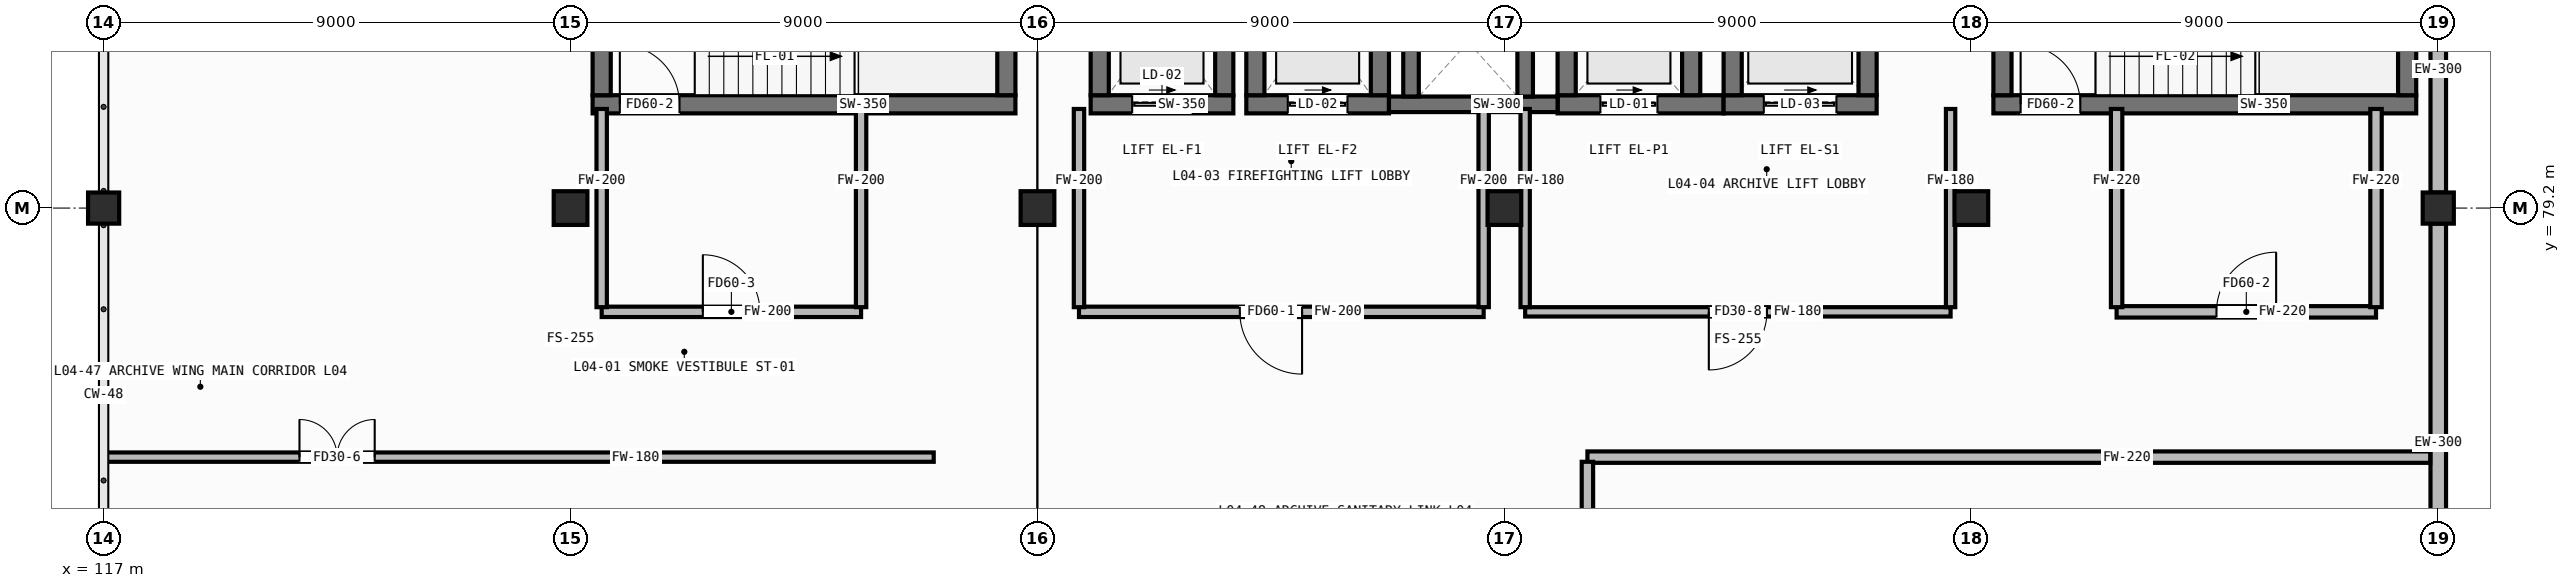
"""IFC4 building model, lengths in metres.
Left out: names, types, materials, properties, quantities, classifications, styles, units other than length and angle.
Written with IfcOpenShell. Run it as: python <this file> out.ifc"""

import sys

from ifc_helpers import new_model, si_unit, direction, frame, frame_2d, origin, origin_2d, place, context, subcontext, project, spatial, rectangle, hollow_rectangle, extrude, element, fill, save


model = new_model("IFC4")
c1 = context("Model", 3, precision=1e-05, world=origin(), true_north=direction((0.0, 1.0)))
c2 = subcontext(c1, "Body", "Model", "MODEL_VIEW")
j1 = project(units=[si_unit("LENGTHUNIT", "METRE"), si_unit("PLANEANGLEUNIT", "RADIAN")], contexts=[c1])
p1 = place(None, origin())
s1 = spatial("IfcSite", under=j1, at=p1, CompositionType="ELEMENT")
p2 = place(p1, origin())
s2 = spatial("IfcBuilding", under=s1, at=p2, CompositionType="ELEMENT")
p3 = place(p2, frame((0.0, 0.0, 12.8)))
s3 = spatial("IfcBuildingStorey", under=s2, at=p3, CompositionType="ELEMENT", Elevation=12.8)
p4 = place(p3, frame((117.0, 79.2, 0.0), z_axis=(0.0, 0.0, 1.0), x_axis=(1.0, 0.0, 0.0)))
e1 = element("IfcColumn", 1, at=p4, inside=s3, PredefinedType="COLUMN", context=c2, shape_type="SweptSolid", body=[
    extrude(hollow_rectangle(XDim=0.6, YDim=0.6, WallThickness=0.025, at=origin_2d()), origin(), (0.0, 0.0, 1.0), 4.2),
])
for number, where, z_axis, x_axis in (
    (2, (126.0, 79.2, 0.0), (0.0, 0.0, 1.0), (1.0, 0.0, 0.0)),
    (3, (135.0, 79.2, 0.0), (0.0, 0.0, 1.0), (1.0, 0.0, 0.0)),
    (4, (144.0, 79.2, 0.0), (0.0, 0.0, 1.0), (1.0, 0.0, 0.0)),
    (5, (153.0, 79.2, 0.0), (0.0, 0.0, 1.0), (1.0, 0.0, 0.0)),
):
    element("IfcColumn", number, at=place(p3, frame(where, z_axis=z_axis, x_axis=x_axis)), inside=s3, PredefinedType="COLUMN", context=c2, shape_type="SweptSolid", body=[
        extrude(hollow_rectangle(XDim=0.65, YDim=0.65, WallThickness=0.025, at=origin_2d()), origin(), (0.0, 0.0, 1.0), 4.2),
    ])
p5 = place(p3, frame((162.0, 79.2, 0.0), z_axis=(0.0, 0.0, 1.0), x_axis=(1.0, 0.0, 0.0)))
e6 = element("IfcColumn", 6, at=p5, inside=s3, PredefinedType="COLUMN", context=c2, shape_type="SweptSolid", body=[
    extrude(hollow_rectangle(XDim=0.6, YDim=0.6, WallThickness=0.025, at=origin_2d()), origin(), (0.0, 0.0, 1.0), 4.2),
])
p6 = place(p3, frame((162.0, 78.9, 0.0), z_axis=(0.0, 0.0, 1.0), x_axis=(0.0, -1.0, 0.0)))
e7 = element("IfcWall", 7, at=p6, inside=s3, PredefinedType="STANDARD", context=c2, shape_type="SweptSolid", body=[
    extrude(rectangle(XDim=6.6, YDim=0.3, at=frame_2d((3.3, 0.0))), origin(), (0.0, 0.0, 1.0), 3.49),
])
p7 = place(p3, frame((162.0, 86.1, 0.0), z_axis=(0.0, 0.0, 1.0), x_axis=(0.0, -1.0, 0.0)))
e8 = element("IfcWall", 8, at=p7, inside=s3, PredefinedType="STANDARD", context=c2, shape_type="SweptSolid", body=[
    extrude(rectangle(XDim=6.6, YDim=0.3, at=frame_2d((3.3, 0.0))), origin(), (0.0, 0.0, 1.0), 3.49),
])
p8 = place(p3, frame((126.425, 81.2, 0.0), z_axis=(0.0, 0.0, 1.0), x_axis=(1.0, 0.0, 0.0)))
e9 = element("IfcWall", 9, at=p8, inside=s3, PredefinedType="SHEAR", context=c2, shape_type="SweptSolid", body=[
    extrude(rectangle(XDim=8.15, YDim=0.35, at=frame_2d((4.075, 0.0))), origin(), (0.0, 0.0, 1.0), 3.94),
])
p9 = place(p8, frame((0.525, 0.0, 0.0)))
e10 = element("IfcOpeningElement", 10, at=p9, cuts=e9, PredefinedType="OPENING", context=c2, shape_type="SweptSolid", body=[
    extrude(rectangle(XDim=1.15, YDim=2.1, at=frame_2d((0.575, 1.05))), frame((0.0, 0.187, 0.0), z_axis=(0.0, -1.0, 0.0), x_axis=(1.0, 0.0, 0.0)), (0.0, 0.0, 1.0), 0.374),
])
for number, where, z_axis, x_axis in (
    (11, (126.6, 81.375, 0.0), (0.0, 0.0, 1.0), (0.0, 1.0, 0.0)),
    (12, (134.4, 81.375, 0.0), (0.0, 0.0, 1.0), (0.0, 1.0, 0.0)),
):
    element("IfcWall", number, at=place(p3, frame(where, z_axis=z_axis, x_axis=x_axis)), inside=s3, PredefinedType="SHEAR", context=c2, shape_type="SweptSolid", body=[
        extrude(rectangle(XDim=3.55, YDim=0.35, at=frame_2d((1.775, 0.0))), origin(), (0.0, 0.0, 1.0), 3.94),
    ])
p10 = place(p3, frame((153.425, 81.2, 0.0), z_axis=(0.0, 0.0, 1.0), x_axis=(1.0, 0.0, 0.0)))
e13 = element("IfcWall", 13, at=p10, inside=s3, PredefinedType="SHEAR", context=c2, shape_type="SweptSolid", body=[
    extrude(rectangle(XDim=8.15, YDim=0.35, at=frame_2d((4.075, 0.0))), origin(), (0.0, 0.0, 1.0), 3.94),
])
p11 = place(p10, frame((0.525, 0.0, 0.0)))
e14 = element("IfcOpeningElement", 14, at=p11, cuts=e13, PredefinedType="OPENING", context=c2, shape_type="SweptSolid", body=[
    extrude(rectangle(XDim=1.15, YDim=2.1, at=frame_2d((0.575, 1.05))), frame((0.0, 0.187, 0.0), z_axis=(0.0, -1.0, 0.0), x_axis=(1.0, 0.0, 0.0)), (0.0, 0.0, 1.0), 0.374),
])
for number, where, z_axis, x_axis in (
    (15, (153.6, 81.375, 0.0), (0.0, 0.0, 1.0), (0.0, 1.0, 0.0)),
    (16, (161.4, 81.375, 0.0), (0.0, 0.0, 1.0), (0.0, 1.0, 0.0)),
):
    element("IfcWall", number, at=place(p3, frame(where, z_axis=z_axis, x_axis=x_axis)), inside=s3, PredefinedType="SHEAR", context=c2, shape_type="SweptSolid", body=[
        extrude(rectangle(XDim=3.55, YDim=0.35, at=frame_2d((1.775, 0.0))), origin(), (0.0, 0.0, 1.0), 3.94),
    ])
p12 = place(p3, frame((136.025, 81.2, 0.0), z_axis=(0.0, 0.0, 1.0), x_axis=(1.0, 0.0, 0.0)))
e17 = element("IfcWall", 17, at=p12, inside=s3, PredefinedType="SHEAR", context=c2, shape_type="SweptSolid", body=[
    extrude(rectangle(XDim=2.75, YDim=0.35, at=frame_2d((1.375, 0.0))), origin(), (0.0, 0.0, 1.0), 3.94),
])
p13 = place(p12, frame((0.8, 0.0, 0.0)))
e18 = element("IfcOpeningElement", 18, at=p13, cuts=e17, PredefinedType="OPENING", context=c2, shape_type="SweptSolid", body=[
    extrude(rectangle(XDim=1.15, YDim=2.12, at=frame_2d((0.575, 1.06))), frame((0.0, 0.187, 0.0), z_axis=(0.0, -1.0, 0.0), x_axis=(1.0, 0.0, 0.0)), (0.0, 0.0, 1.0), 0.374),
])
for number, where, z_axis, x_axis in (
    (19, (136.2, 81.375, 0.0), (0.0, 0.0, 1.0), (0.0, 1.0, 0.0)),
    (20, (138.6, 81.375, 0.0), (0.0, 0.0, 1.0), (0.0, 1.0, 0.0)),
):
    element("IfcWall", number, at=place(p3, frame(where, z_axis=z_axis, x_axis=x_axis)), inside=s3, PredefinedType="SHEAR", context=c2, shape_type="SweptSolid", body=[
        extrude(rectangle(XDim=2.85, YDim=0.35, at=frame_2d((1.425, 0.0))), origin(), (0.0, 0.0, 1.0), 3.94),
    ])
p14 = place(p3, frame((139.025, 81.2, 0.0), z_axis=(0.0, 0.0, 1.0), x_axis=(1.0, 0.0, 0.0)))
e21 = element("IfcWall", 21, at=p14, inside=s3, PredefinedType="SHEAR", context=c2, shape_type="SweptSolid", body=[
    extrude(rectangle(XDim=2.75, YDim=0.35, at=frame_2d((1.375, 0.0))), origin(), (0.0, 0.0, 1.0), 3.94),
])
p15 = place(p14, frame((0.8, 0.0, 0.0)))
e22 = element("IfcOpeningElement", 22, at=p15, cuts=e21, PredefinedType="OPENING", context=c2, shape_type="SweptSolid", body=[
    extrude(rectangle(XDim=1.15, YDim=2.12, at=frame_2d((0.575, 1.06))), frame((0.0, 0.187, 0.0), z_axis=(0.0, -1.0, 0.0), x_axis=(1.0, 0.0, 0.0)), (0.0, 0.0, 1.0), 0.374),
])
for number, where, z_axis, x_axis in (
    (23, (139.2, 81.375, 0.0), (0.0, 0.0, 1.0), (0.0, 1.0, 0.0)),
    (24, (141.6, 81.375, 0.0), (0.0, 0.0, 1.0), (0.0, 1.0, 0.0)),
):
    element("IfcWall", number, at=place(p3, frame(where, z_axis=z_axis, x_axis=x_axis)), inside=s3, PredefinedType="SHEAR", context=c2, shape_type="SweptSolid", body=[
        extrude(rectangle(XDim=2.85, YDim=0.35, at=frame_2d((1.425, 0.0))), origin(), (0.0, 0.0, 1.0), 3.94),
    ])
p16 = place(p3, frame((145.025, 81.2, 0.0), z_axis=(0.0, 0.0, 1.0), x_axis=(1.0, 0.0, 0.0)))
e25 = element("IfcWall", 25, at=p16, inside=s3, PredefinedType="SHEAR", context=c2, shape_type="SweptSolid", body=[
    extrude(rectangle(XDim=3.2, YDim=0.35, at=frame_2d((1.6, 0.0))), origin(), (0.0, 0.0, 1.0), 3.94),
])
p17 = place(p16, frame((0.825, 0.0, 0.0)))
e26 = element("IfcOpeningElement", 26, at=p17, cuts=e25, PredefinedType="OPENING", context=c2, shape_type="SweptSolid", body=[
    extrude(rectangle(XDim=1.1, YDim=2.1, at=frame_2d((0.55, 1.05))), frame((0.0, 0.187, 0.0), z_axis=(0.0, -1.0, 0.0), x_axis=(1.0, 0.0, 0.0)), (0.0, 0.0, 1.0), 0.374),
])
for number, where, z_axis, x_axis in (
    (27, (145.2, 81.375, 0.0), (0.0, 0.0, 1.0), (0.0, 1.0, 0.0)),
    (28, (147.6, 81.375, 0.0), (0.0, 0.0, 1.0), (0.0, 1.0, 0.0)),
):
    element("IfcWall", number, at=place(p3, frame(where, z_axis=z_axis, x_axis=x_axis)), inside=s3, PredefinedType="SHEAR", context=c2, shape_type="SweptSolid", body=[
        extrude(rectangle(XDim=2.45, YDim=0.35, at=frame_2d((1.225, 0.0))), origin(), (0.0, 0.0, 1.0), 3.94),
    ])
p18 = place(p3, frame((148.225, 81.2, 0.0), z_axis=(0.0, 0.0, 1.0), x_axis=(1.0, 0.0, 0.0)))
e29 = element("IfcWall", 29, at=p18, inside=s3, PredefinedType="SHEAR", context=c2, shape_type="SweptSolid", body=[
    extrude(rectangle(XDim=2.95, YDim=0.35, at=frame_2d((1.475, 0.0))), origin(), (0.0, 0.0, 1.0), 3.94),
])
p19 = place(p18, frame((0.775, 0.0, 0.0)))
e30 = element("IfcOpeningElement", 30, at=p19, cuts=e29, PredefinedType="OPENING", context=c2, shape_type="SweptSolid", body=[
    extrude(rectangle(XDim=1.4, YDim=2.15, at=frame_2d((0.7, 1.075))), frame((0.0, 0.187, 0.0), z_axis=(0.0, -1.0, 0.0), x_axis=(1.0, 0.0, 0.0)), (0.0, 0.0, 1.0), 0.374),
])
for number, where, z_axis, x_axis in (
    (31, (148.4, 81.375, 0.0), (0.0, 0.0, 1.0), (0.0, 1.0, 0.0)),
    (32, (151.0, 81.375, 0.0), (0.0, 0.0, 1.0), (0.0, 1.0, 0.0)),
):
    element("IfcWall", number, at=place(p3, frame(where, z_axis=z_axis, x_axis=x_axis)), inside=s3, PredefinedType="SHEAR", context=c2, shape_type="SweptSolid", body=[
        extrude(rectangle(XDim=3.05, YDim=0.35, at=frame_2d((1.525, 0.0))), origin(), (0.0, 0.0, 1.0), 3.94),
    ])
p20 = place(p3, frame((141.775, 81.2, 0.0), z_axis=(0.0, 0.0, 1.0), x_axis=(1.0, 0.0, 0.0)))
e33 = element("IfcWall", 33, at=p20, inside=s3, PredefinedType="SHEAR", context=c2, shape_type="SweptSolid", body=[
    extrude(rectangle(XDim=3.25, YDim=0.3, at=frame_2d((1.625, 0.0))), origin(), (0.0, 0.0, 1.0), 3.94),
])
for number, where, z_axis, x_axis in (
    (34, (142.2, 81.35, 0.0), (0.0, 0.0, 1.0), (0.0, 1.0, 0.0)),
    (35, (144.4, 81.35, 0.0), (0.0, 0.0, 1.0), (0.0, 1.0, 0.0)),
):
    element("IfcWall", number, at=place(p3, frame(where, z_axis=z_axis, x_axis=x_axis)), inside=s3, PredefinedType="SHEAR", context=c2, shape_type="SweptSolid", body=[
        extrude(rectangle(XDim=2.1, YDim=0.3, at=frame_2d((1.05, 0.0))), origin(), (0.0, 0.0, 1.0), 3.94),
    ])
p21 = place(p3, frame((126.6, 77.2, 0.0), z_axis=(0.0, 0.0, 1.0), x_axis=(1.0, 0.0, 0.0)))
e36 = element("IfcWall", 36, at=p21, inside=s3, PredefinedType="PARTITIONING", context=c2, shape_type="SweptSolid", body=[
    extrude(rectangle(XDim=5.0, YDim=0.2, at=frame_2d((2.5, 0.0))), origin(), (0.0, 0.0, 1.0), 3.94),
])
p22 = place(p21, frame((1.95, 0.0, 0.0)))
e37 = element("IfcOpeningElement", 37, at=p22, cuts=e36, PredefinedType="OPENING", context=c2, shape_type="SweptSolid", body=[
    extrude(rectangle(XDim=1.1, YDim=2.08, at=frame_2d((0.55, 1.04))), frame((0.0, 0.112, 0.0), z_axis=(0.0, -1.0, 0.0), x_axis=(1.0, 0.0, 0.0)), (0.0, 0.0, 1.0), 0.224),
])
for number, where, z_axis, x_axis in (
    (38, (126.6, 77.29, 0.0), (0.0, 0.0, 1.0), (0.0, 1.0, 0.0)),
    (39, (131.6, 77.29, 0.0), (0.0, 0.0, 1.0), (0.0, 1.0, 0.0)),
):
    element("IfcWall", number, at=place(p3, frame(where, z_axis=z_axis, x_axis=x_axis)), inside=s3, PredefinedType="PARTITIONING", context=c2, shape_type="SweptSolid", body=[
        extrude(rectangle(XDim=3.82, YDim=0.2, at=frame_2d((1.91, 0.0))), origin(), (0.0, 0.0, 1.0), 3.94),
    ])
p23 = place(p3, frame((155.8, 77.2, 0.0), z_axis=(0.0, 0.0, 1.0), x_axis=(1.0, 0.0, 0.0)))
e40 = element("IfcWall", 40, at=p23, inside=s3, PredefinedType="PARTITIONING", context=c2, shape_type="SweptSolid", body=[
    extrude(rectangle(XDim=5.0, YDim=0.22, at=frame_2d((2.5, 0.0))), origin(), (0.0, 0.0, 1.0), 3.94),
])
p24 = place(p23, frame((1.925, 0.0, 0.0)))
e41 = element("IfcOpeningElement", 41, at=p24, cuts=e40, PredefinedType="OPENING", context=c2, shape_type="SweptSolid", body=[
    extrude(rectangle(XDim=1.15, YDim=2.1, at=frame_2d((0.575, 1.05))), frame((0.0, 0.122, 0.0), z_axis=(0.0, -1.0, 0.0), x_axis=(1.0, 0.0, 0.0)), (0.0, 0.0, 1.0), 0.244),
])
for number, where, z_axis, x_axis in (
    (42, (155.8, 77.29, 0.0), (0.0, 0.0, 1.0), (0.0, 1.0, 0.0)),
    (43, (160.8, 77.29, 0.0), (0.0, 0.0, 1.0), (0.0, 1.0, 0.0)),
):
    element("IfcWall", number, at=place(p3, frame(where, z_axis=z_axis, x_axis=x_axis)), inside=s3, PredefinedType="PARTITIONING", context=c2, shape_type="SweptSolid", body=[
        extrude(rectangle(XDim=3.82, YDim=0.22, at=frame_2d((1.91, 0.0))), origin(), (0.0, 0.0, 1.0), 3.94),
    ])
p25 = place(p3, frame((135.8, 77.2, 0.0), z_axis=(0.0, 0.0, 1.0), x_axis=(1.0, 0.0, 0.0)))
e44 = element("IfcWall", 44, at=p25, inside=s3, PredefinedType="PARTITIONING", context=c2, shape_type="SweptSolid", body=[
    extrude(rectangle(XDim=7.8, YDim=0.2, at=frame_2d((3.9, 0.0))), origin(), (0.0, 0.0, 1.0), 3.94),
])
p26 = place(p25, frame((3.1, 0.0, 0.0)))
e45 = element("IfcOpeningElement", 45, at=p26, cuts=e44, PredefinedType="OPENING", context=c2, shape_type="SweptSolid", body=[
    extrude(rectangle(XDim=1.2, YDim=2.1, at=frame_2d((0.6, 1.05))), frame((0.0, 0.112, 0.0), z_axis=(0.0, -1.0, 0.0), x_axis=(1.0, 0.0, 0.0)), (0.0, 0.0, 1.0), 0.224),
])
for number, where, z_axis, x_axis in (
    (46, (135.8, 77.29, 0.0), (0.0, 0.0, 1.0), (0.0, 1.0, 0.0)),
    (47, (143.6, 77.29, 0.0), (0.0, 0.0, 1.0), (0.0, 1.0, 0.0)),
):
    element("IfcWall", number, at=place(p3, frame(where, z_axis=z_axis, x_axis=x_axis)), inside=s3, PredefinedType="PARTITIONING", context=c2, shape_type="SweptSolid", body=[
        extrude(rectangle(XDim=3.82, YDim=0.2, at=frame_2d((1.91, 0.0))), origin(), (0.0, 0.0, 1.0), 3.94),
    ])
p27 = place(p3, frame((144.4, 77.2, 0.0), z_axis=(0.0, 0.0, 1.0), x_axis=(1.0, 0.0, 0.0)))
e48 = element("IfcWall", 48, at=p27, inside=s3, PredefinedType="PARTITIONING", context=c2, shape_type="SweptSolid", body=[
    extrude(rectangle(XDim=8.2, YDim=0.18, at=frame_2d((4.1, 0.0))), origin(), (0.0, 0.0, 1.0), 3.94),
])
p28 = place(p27, frame((3.54, 0.0, 0.0)))
e49 = element("IfcOpeningElement", 49, at=p28, cuts=e48, PredefinedType="OPENING", context=c2, shape_type="SweptSolid", body=[
    extrude(rectangle(XDim=1.12, YDim=2.08, at=frame_2d((0.56, 1.04))), frame((0.0, 0.102, 0.0), z_axis=(0.0, -1.0, 0.0), x_axis=(1.0, 0.0, 0.0)), (0.0, 0.0, 1.0), 0.204),
])
for number, where, z_axis, x_axis in (
    (50, (144.4, 77.29, 0.0), (0.0, 0.0, 1.0), (0.0, 1.0, 0.0)),
    (51, (152.6, 77.29, 0.0), (0.0, 0.0, 1.0), (0.0, 1.0, 0.0)),
):
    element("IfcWall", number, at=place(p3, frame(where, z_axis=z_axis, x_axis=x_axis)), inside=s3, PredefinedType="PARTITIONING", context=c2, shape_type="SweptSolid", body=[
        extrude(rectangle(XDim=3.82, YDim=0.18, at=frame_2d((1.91, 0.0))), origin(), (0.0, 0.0, 1.0), 3.94),
    ])
p29 = place(p3, frame((117.035, 74.4, 0.0), z_axis=(0.0, 0.0, 1.0), x_axis=(1.0, 0.0, 0.0)))
e52 = element("IfcWall", 52, at=p29, inside=s3, PredefinedType="PARTITIONING", context=c2, shape_type="SweptSolid", body=[
    extrude(rectangle(XDim=15.965, YDim=0.18, at=frame_2d((7.982, 0.0))), origin(), (0.0, 0.0, 1.0), 3.94),
])
p30 = place(p29, frame((3.74, 0.0, 0.0)))
e53 = element("IfcOpeningElement", 53, at=p30, cuts=e52, PredefinedType="OPENING", context=c2, shape_type="SweptSolid", body=[
    extrude(rectangle(XDim=1.45, YDim=2.1, at=frame_2d((0.725, 1.05))), frame((0.0, 0.102, 0.0), z_axis=(0.0, -1.0, 0.0), x_axis=(1.0, 0.0, 0.0)), (0.0, 0.0, 1.0), 0.204),
])
p31 = place(p3, frame((145.6, 74.4, 0.0), z_axis=(0.0, 0.0, 1.0), x_axis=(1.0, 0.0, 0.0)))
e54 = element("IfcWall", 54, at=p31, inside=s3, PredefinedType="PARTITIONING", context=c2, shape_type="SweptSolid", body=[
    extrude(rectangle(XDim=16.245, YDim=0.22, at=frame_2d((8.123, 0.0))), origin(), (0.0, 0.0, 1.0), 3.94),
])
p32 = place(p3, frame((145.6, 43.365, 0.0), z_axis=(0.0, 0.0, 1.0), x_axis=(0.0, 1.0, 0.0)))
e55 = element("IfcWall", 55, at=p32, inside=s3, PredefinedType="PARTITIONING", context=c2, shape_type="SweptSolid", body=[
    extrude(rectangle(XDim=30.945, YDim=0.22, at=frame_2d((15.473, 0.0))), origin(), (0.0, 0.0, 1.0), 3.94),
])
p33 = place(p32, frame((17.035, 0.0, 0.0)))
e56 = element("IfcOpeningElement", 56, at=p33, cuts=e55, PredefinedType="OPENING", context=c2, shape_type="SweptSolid", body=[
    extrude(rectangle(XDim=1.6, YDim=2.12, at=frame_2d((0.8, 1.06))), frame((0.0, 0.122, 0.0), z_axis=(0.0, -1.0, 0.0), x_axis=(1.0, 0.0, 0.0)), (0.0, 0.0, 1.0), 0.244),
])
p34 = place(p9, origin())
e57 = element("IfcDoor", 57, at=p34, inside=s3, OperationType="SINGLE_SWING_LEFT", PredefinedType="DOOR", context=c2, shape_type="SweptSolid", body=[
    extrude(rectangle(XDim=1.15, YDim=2.1, at=frame_2d((0.575, 1.05))), frame((0.0, 0.025, 0.0), z_axis=(0.0, -1.0, 0.0), x_axis=(1.0, 0.0, 0.0)), (0.0, 0.0, 1.0), 0.05),
])
fill(e10, e57)
p35 = place(p11, origin())
e58 = element("IfcDoor", 58, at=p35, inside=s3, OperationType="SINGLE_SWING_LEFT", PredefinedType="DOOR", context=c2, shape_type="SweptSolid", body=[
    extrude(rectangle(XDim=1.15, YDim=2.1, at=frame_2d((0.575, 1.05))), frame((0.0, 0.025, 0.0), z_axis=(0.0, -1.0, 0.0), x_axis=(1.0, 0.0, 0.0)), (0.0, 0.0, 1.0), 0.05),
])
fill(e14, e58)
p36 = place(p13, origin())
e59 = element("IfcDoor", 59, at=p36, inside=s3, OperationType="SLIDING_TO_LEFT", PredefinedType="DOOR", context=c2, shape_type="SweptSolid", body=[
    extrude(rectangle(XDim=1.15, YDim=2.12, at=frame_2d((0.575, 1.06))), frame((0.0, 0.025, 0.0), z_axis=(0.0, -1.0, 0.0), x_axis=(1.0, 0.0, 0.0)), (0.0, 0.0, 1.0), 0.05),
])
fill(e18, e59)
p37 = place(p15, origin())
e60 = element("IfcDoor", 60, at=p37, inside=s3, OperationType="SLIDING_TO_LEFT", PredefinedType="DOOR", context=c2, shape_type="SweptSolid", body=[
    extrude(rectangle(XDim=1.15, YDim=2.12, at=frame_2d((0.575, 1.06))), frame((0.0, 0.025, 0.0), z_axis=(0.0, -1.0, 0.0), x_axis=(1.0, 0.0, 0.0)), (0.0, 0.0, 1.0), 0.05),
])
fill(e22, e60)
p38 = place(p17, origin())
e61 = element("IfcDoor", 61, at=p38, inside=s3, OperationType="SLIDING_TO_LEFT", PredefinedType="DOOR", context=c2, shape_type="SweptSolid", body=[
    extrude(rectangle(XDim=1.1, YDim=2.1, at=frame_2d((0.55, 1.05))), frame((0.0, 0.025, 0.0), z_axis=(0.0, -1.0, 0.0), x_axis=(1.0, 0.0, 0.0)), (0.0, 0.0, 1.0), 0.05),
])
fill(e26, e61)
p39 = place(p19, origin())
e62 = element("IfcDoor", 62, at=p39, inside=s3, OperationType="SLIDING_TO_LEFT", PredefinedType="DOOR", context=c2, shape_type="SweptSolid", body=[
    extrude(rectangle(XDim=1.4, YDim=2.15, at=frame_2d((0.7, 1.075))), frame((0.0, 0.025, 0.0), z_axis=(0.0, -1.0, 0.0), x_axis=(1.0, 0.0, 0.0)), (0.0, 0.0, 1.0), 0.05),
])
fill(e30, e62)
p40 = place(p22, origin())
e63 = element("IfcDoor", 63, at=p40, inside=s3, OperationType="SINGLE_SWING_LEFT", PredefinedType="DOOR", context=c2, shape_type="SweptSolid", body=[
    extrude(rectangle(XDim=1.1, YDim=2.08, at=frame_2d((0.55, 1.04))), frame((0.0, 0.025, 0.0), z_axis=(0.0, -1.0, 0.0), x_axis=(1.0, 0.0, 0.0)), (0.0, 0.0, 1.0), 0.05),
])
fill(e37, e63)
p41 = place(p24, origin())
e64 = element("IfcDoor", 64, at=p41, inside=s3, OperationType="SINGLE_SWING_RIGHT", PredefinedType="DOOR", context=c2, shape_type="SweptSolid", body=[
    extrude(rectangle(XDim=1.15, YDim=2.1, at=frame_2d((0.575, 1.05))), frame((0.0, 0.025, 0.0), z_axis=(0.0, -1.0, 0.0), x_axis=(1.0, 0.0, 0.0)), (0.0, 0.0, 1.0), 0.05),
])
fill(e41, e64)
p42 = place(p26, frame((1.2, 0.0, 0.0), z_axis=(0.0, 0.0, 1.0), x_axis=(-1.0, 0.0, 0.0)))
e65 = element("IfcDoor", 65, at=p42, inside=s3, OperationType="SINGLE_SWING_LEFT", PredefinedType="DOOR", context=c2, shape_type="SweptSolid", body=[
    extrude(rectangle(XDim=1.2, YDim=2.1, at=frame_2d((0.6, 1.05))), frame((0.0, 0.025, 0.0), z_axis=(0.0, -1.0, 0.0), x_axis=(1.0, 0.0, 0.0)), (0.0, 0.0, 1.0), 0.05),
])
fill(e45, e65)
p43 = place(p28, frame((1.12, 0.0, 0.0), z_axis=(0.0, 0.0, 1.0), x_axis=(-1.0, 0.0, 0.0)))
e66 = element("IfcDoor", 66, at=p43, inside=s3, OperationType="SINGLE_SWING_RIGHT", PredefinedType="DOOR", context=c2, shape_type="SweptSolid", body=[
    extrude(rectangle(XDim=1.12, YDim=2.08, at=frame_2d((0.56, 1.04))), frame((0.0, 0.025, 0.0), z_axis=(0.0, -1.0, 0.0), x_axis=(1.0, 0.0, 0.0)), (0.0, 0.0, 1.0), 0.05),
])
fill(e49, e66)
p44 = place(p30, origin())
e67 = element("IfcDoor", 67, at=p44, inside=s3, OperationType="DOUBLE_DOOR_SINGLE_SWING", PredefinedType="DOOR", context=c2, shape_type="SweptSolid", body=[
    extrude(rectangle(XDim=1.45, YDim=2.1, at=frame_2d((0.725, 1.05))), frame((0.0, 0.025, 0.0), z_axis=(0.0, -1.0, 0.0), x_axis=(1.0, 0.0, 0.0)), (0.0, 0.0, 1.0), 0.05),
])
fill(e53, e67)
save(model, sys.argv[1])
